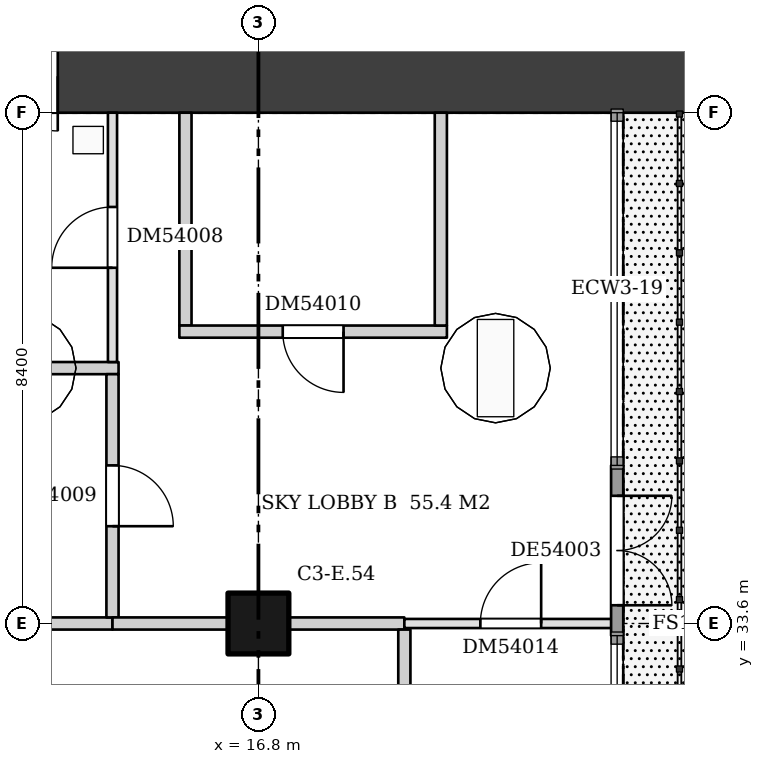
"""IFC4 building model, lengths in metres.
Left out: names, types, materials, properties, quantities, classifications, styles, units other than length and angle.
Written with IfcOpenShell. Run it as: python <this file> out.ifc"""

import sys

from ifc_helpers import new_model, si_unit, direction, frame, frame_2d, origin, origin_2d, place, context, subcontext, project, spatial, rectangle, extrude, element, fill, save


model = new_model("IFC4")
c1 = context("Model", 3, precision=1e-05, world=origin(), true_north=direction((0.0, 1.0)))
c2 = subcontext(c1, "Body", "Model", "MODEL_VIEW")
j1 = project(units=[si_unit("LENGTHUNIT", "METRE"), si_unit("PLANEANGLEUNIT", "RADIAN")], contexts=[c1])
p1 = place(None, origin())
s1 = spatial("IfcSite", under=j1, at=p1, CompositionType="ELEMENT")
p2 = place(p1, origin())
s2 = spatial("IfcBuilding", under=s1, at=p2, CompositionType="ELEMENT")
p3 = place(p2, frame((0.0, 0.0, 207.2)))
s3 = spatial("IfcBuildingStorey", under=s2, at=p3, CompositionType="ELEMENT", Elevation=207.2)
p4 = place(p3, frame((16.8, 33.6, 0.0), z_axis=(0.0, 0.0, 1.0), x_axis=(1.0, 0.0, 0.0)))
e1 = element("IfcColumn", 1, at=p4, inside=s3, PredefinedType="COLUMN", context=c2, shape_type="SweptSolid", body=[
    extrude(rectangle(XDim=1.0, YDim=1.0, at=origin_2d()), origin(), (0.0, 0.0, 1.0), 6.72),
])
p5 = place(p3, frame((9.6, 42.6, 0.0), z_axis=(0.0, 0.0, 1.0), x_axis=(1.0, 0.0, 0.0)))
e2 = element("IfcWall", 2, at=p5, inside=s3, PredefinedType="SHEAR", context=c2, shape_type="SweptSolid", body=[
    extrude(rectangle(XDim=14.4, YDim=1.2, at=frame_2d((7.2, 0.0))), origin(), (0.0, 0.0, 1.0), 6.72),
])
p6 = place(p5, frame((2.1, 0.0, 0.0)))
e3 = element("IfcOpeningElement", 3, at=p6, cuts=e2, PredefinedType="OPENING", context=c2, shape_type="SweptSolid", body=[
    extrude(rectangle(XDim=1.8, YDim=2.1, at=frame_2d((0.9, 1.05))), frame((0.0, 0.61, 0.0), z_axis=(0.0, -1.0, 0.0), x_axis=(1.0, 0.0, 0.0)), (0.0, 0.0, 1.0), 1.22),
])
p7 = place(p3, frame((10.9, 33.6, 0.0), z_axis=(0.0, 0.0, 1.0), x_axis=(1.0, 0.0, 0.0)))
e4 = element("IfcWall", 4, at=p7, inside=s3, PredefinedType="PARTITIONING", context=c2, shape_type="SweptSolid", body=[
    extrude(rectangle(XDim=3.5, YDim=0.2, at=frame_2d((1.75, 0.0))), origin(), (0.0, 0.0, 1.0), 6.72),
])
p8 = place(p3, frame((10.9, 37.8, 0.0), z_axis=(0.0, 0.0, 1.0), x_axis=(1.0, 0.0, 0.0)))
e5 = element("IfcWall", 5, at=p8, inside=s3, PredefinedType="PARTITIONING", context=c2, shape_type="SweptSolid", body=[
    extrude(rectangle(XDim=3.6, YDim=0.2, at=frame_2d((1.8, 0.0))), origin(), (0.0, 0.0, 1.0), 6.72),
])
p9 = place(p3, frame((14.4, 33.7, 0.0), z_axis=(0.0, 0.0, 1.0), x_axis=(0.0, 1.0, 0.0)))
e6 = element("IfcWall", 6, at=p9, inside=s3, PredefinedType="PARTITIONING", context=c2, shape_type="SweptSolid", body=[
    extrude(rectangle(XDim=4.0, YDim=0.2, at=frame_2d((2.0, 0.0))), origin(), (0.0, 0.0, 1.0), 6.72),
])
p10 = place(p9, frame((1.5, 0.0, 0.0)))
e7 = element("IfcOpeningElement", 7, at=p10, cuts=e6, PredefinedType="OPENING", context=c2, shape_type="SweptSolid", body=[
    extrude(rectangle(XDim=1.0, YDim=2.1, at=frame_2d((0.5, 1.05))), frame((0.0, 0.11, 0.0), z_axis=(0.0, -1.0, 0.0), x_axis=(1.0, 0.0, 0.0)), (0.0, 0.0, 1.0), 0.22),
])
p11 = place(p3, frame((14.4, 33.6, 0.0), z_axis=(0.0, 0.0, 1.0), x_axis=(1.0, 0.0, 0.0)))
e8 = element("IfcWall", 8, at=p11, inside=s3, PredefinedType="PARTITIONING", context=c2, shape_type="SweptSolid", body=[
    extrude(rectangle(XDim=1.9, YDim=0.2, at=frame_2d((0.95, 0.0))), origin(), (0.0, 0.0, 1.0), 6.72),
])
p12 = place(p3, frame((17.3, 33.6, 0.0), z_axis=(0.0, 0.0, 1.0), x_axis=(1.0, 0.0, 0.0)))
e9 = element("IfcWall", 9, at=p12, inside=s3, PredefinedType="PARTITIONING", context=c2, shape_type="SweptSolid", body=[
    extrude(rectangle(XDim=1.9, YDim=0.2, at=frame_2d((0.95, 0.0))), origin(), (0.0, 0.0, 1.0), 6.72),
])
p13 = place(p3, frame((14.4, 37.9, 0.0), z_axis=(0.0, 0.0, 1.0), x_axis=(0.0, 1.0, 0.0)))
e10 = element("IfcWall", 10, at=p13, inside=s3, PredefinedType="PARTITIONING", context=c2, shape_type="SweptSolid", body=[
    extrude(rectangle(XDim=4.1, YDim=0.15, at=frame_2d((2.05, 0.0))), origin(), (0.0, 0.0, 1.0), 6.72),
])
p14 = place(p13, frame((1.55, 0.0, 0.0)))
e11 = element("IfcOpeningElement", 11, at=p14, cuts=e10, PredefinedType="OPENING", context=c2, shape_type="SweptSolid", body=[
    extrude(rectangle(XDim=1.0, YDim=2.1, at=frame_2d((0.5, 1.05))), frame((0.0, 0.085, 0.0), z_axis=(0.0, -1.0, 0.0), x_axis=(1.0, 0.0, 0.0)), (0.0, 0.0, 1.0), 0.17),
])
p15 = place(p3, frame((15.6, 38.5, 0.0), z_axis=(0.0, 0.0, 1.0), x_axis=(0.0, 1.0, 0.0)))
e12 = element("IfcWall", 12, at=p15, inside=s3, PredefinedType="PARTITIONING", context=c2, shape_type="SweptSolid", body=[
    extrude(rectangle(XDim=3.5, YDim=0.2, at=frame_2d((1.75, 0.0))), origin(), (0.0, 0.0, 1.0), 6.72),
])
p16 = place(p3, frame((15.5, 38.4, 0.0), z_axis=(0.0, 0.0, 1.0), x_axis=(1.0, 0.0, 0.0)))
e13 = element("IfcWall", 13, at=p16, inside=s3, PredefinedType="PARTITIONING", context=c2, shape_type="SweptSolid", body=[
    extrude(rectangle(XDim=4.4, YDim=0.2, at=frame_2d((2.2, 0.0))), origin(), (0.0, 0.0, 1.0), 6.72),
])
p17 = place(p16, frame((1.7, 0.0, 0.0)))
e14 = element("IfcOpeningElement", 14, at=p17, cuts=e13, PredefinedType="OPENING", context=c2, shape_type="SweptSolid", body=[
    extrude(rectangle(XDim=1.0, YDim=2.1, at=frame_2d((0.5, 1.05))), frame((0.0, 0.11, 0.0), z_axis=(0.0, -1.0, 0.0), x_axis=(1.0, 0.0, 0.0)), (0.0, 0.0, 1.0), 0.22),
])
p18 = place(p3, frame((19.2, 29.5, 0.0), z_axis=(0.0, 0.0, 1.0), x_axis=(0.0, 1.0, 0.0)))
e15 = element("IfcWall", 15, at=p18, inside=s3, PredefinedType="PARTITIONING", context=c2, shape_type="SweptSolid", body=[
    extrude(rectangle(XDim=4.0, YDim=0.2, at=frame_2d((2.0, 0.0))), origin(), (0.0, 0.0, 1.0), 6.72),
])
p19 = place(p18, frame((1.0, 0.0, 0.0)))
e16 = element("IfcOpeningElement", 16, at=p19, cuts=e15, PredefinedType="OPENING", context=c2, shape_type="SweptSolid", body=[
    extrude(rectangle(XDim=2.0, YDim=2.1, at=frame_2d((1.0, 1.05))), frame((0.0, 0.11, 0.0), z_axis=(0.0, -1.0, 0.0), x_axis=(1.0, 0.0, 0.0)), (0.0, 0.0, 1.0), 0.22),
])
p20 = place(p3, frame((19.2, 33.6, 0.0), z_axis=(0.0, 0.0, 1.0), x_axis=(1.0, 0.0, 0.0)))
e17 = element("IfcWall", 17, at=p20, inside=s3, PredefinedType="PARTITIONING", context=c2, shape_type="SweptSolid", body=[
    extrude(rectangle(XDim=3.5, YDim=0.15, at=frame_2d((1.75, 0.0))), origin(), (0.0, 0.0, 1.0), 6.72),
])
p21 = place(p20, frame((1.25, 0.0, 0.0)))
e18 = element("IfcOpeningElement", 18, at=p21, cuts=e17, PredefinedType="OPENING", context=c2, shape_type="SweptSolid", body=[
    extrude(rectangle(XDim=1.0, YDim=2.1, at=frame_2d((0.5, 1.05))), frame((0.0, 0.085, 0.0), z_axis=(0.0, -1.0, 0.0), x_axis=(1.0, 0.0, 0.0)), (0.0, 0.0, 1.0), 0.17),
])
p22 = place(p3, frame((19.8, 38.5, 0.0), z_axis=(0.0, 0.0, 1.0), x_axis=(0.0, 1.0, 0.0)))
e19 = element("IfcWall", 19, at=p22, inside=s3, PredefinedType="PARTITIONING", context=c2, shape_type="SweptSolid", body=[
    extrude(rectangle(XDim=3.5, YDim=0.2, at=frame_2d((1.75, 0.0))), origin(), (0.0, 0.0, 1.0), 6.72),
])
p23 = place(p3, frame((22.7, 33.4, 0.0), z_axis=(0.0, 0.0, 1.0), x_axis=(0.0, 1.0, 0.0)))
e20 = element("IfcWall", 20, at=p23, inside=s3, PredefinedType="SOLIDWALL", context=c2, shape_type="SweptSolid", body=[
    extrude(rectangle(XDim=2.8, YDim=0.2, at=frame_2d((1.4, 0.0))), origin(), (0.0, 0.0, 1.0), 6.72),
])
p24 = place(p23, frame((0.5, 0.0, 0.0)))
e21 = element("IfcOpeningElement", 21, at=p24, cuts=e20, PredefinedType="OPENING", context=c2, shape_type="SweptSolid", body=[
    extrude(rectangle(XDim=1.8, YDim=2.4, at=frame_2d((0.9, 1.2))), frame((0.0, 0.11, 0.0), z_axis=(0.0, -1.0, 0.0), x_axis=(1.0, 0.0, 0.0)), (0.0, 0.0, 1.0), 0.22),
])
p25 = place(p6, frame((1.8, 0.0, 0.0), z_axis=(0.0, 0.0, 1.0), x_axis=(-1.0, 0.0, 0.0)))
e22 = element("IfcDoor", 22, at=p25, inside=s3, OperationType="DOUBLE_DOOR_SINGLE_SWING", PredefinedType="DOOR", context=c2, shape_type="SweptSolid", body=[
    extrude(rectangle(XDim=1.8, YDim=2.1, at=frame_2d((0.9, 1.05))), frame((0.0, 0.025, 0.0), z_axis=(0.0, -1.0, 0.0), x_axis=(1.0, 0.0, 0.0)), (0.0, 0.0, 1.0), 0.05),
])
fill(e3, e22)
p26 = place(p14, origin())
e23 = element("IfcDoor", 23, at=p26, inside=s3, OperationType="SINGLE_SWING_LEFT", PredefinedType="DOOR", context=c2, shape_type="SweptSolid", body=[
    extrude(rectangle(XDim=1.0, YDim=2.1, at=frame_2d((0.5, 1.05))), frame((0.0, 0.025, 0.0), z_axis=(0.0, -1.0, 0.0), x_axis=(1.0, 0.0, 0.0)), (0.0, 0.0, 1.0), 0.05),
])
fill(e11, e23)
p27 = place(p10, frame((1.0, 0.0, 0.0), z_axis=(0.0, 0.0, 1.0), x_axis=(-1.0, 0.0, 0.0)))
e24 = element("IfcDoor", 24, at=p27, inside=s3, OperationType="SINGLE_SWING_RIGHT", PredefinedType="DOOR", context=c2, shape_type="SweptSolid", body=[
    extrude(rectangle(XDim=1.0, YDim=2.1, at=frame_2d((0.5, 1.05))), frame((0.0, 0.025, 0.0), z_axis=(0.0, -1.0, 0.0), x_axis=(1.0, 0.0, 0.0)), (0.0, 0.0, 1.0), 0.05),
])
fill(e7, e24)
p28 = place(p17, frame((1.0, 0.0, 0.0), z_axis=(0.0, 0.0, 1.0), x_axis=(-1.0, 0.0, 0.0)))
e25 = element("IfcDoor", 25, at=p28, inside=s3, OperationType="SINGLE_SWING_LEFT", PredefinedType="DOOR", context=c2, shape_type="SweptSolid", body=[
    extrude(rectangle(XDim=1.0, YDim=2.1, at=frame_2d((0.5, 1.05))), frame((0.0, 0.025, 0.0), z_axis=(0.0, -1.0, 0.0), x_axis=(1.0, 0.0, 0.0)), (0.0, 0.0, 1.0), 0.05),
])
fill(e14, e25)
p29 = place(p21, origin())
e26 = element("IfcDoor", 26, at=p29, inside=s3, OperationType="SINGLE_SWING_RIGHT", PredefinedType="DOOR", context=c2, shape_type="SweptSolid", body=[
    extrude(rectangle(XDim=1.0, YDim=2.1, at=frame_2d((0.5, 1.05))), frame((0.0, 0.025, 0.0), z_axis=(0.0, -1.0, 0.0), x_axis=(1.0, 0.0, 0.0)), (0.0, 0.0, 1.0), 0.05),
])
fill(e18, e26)
p30 = place(p24, frame((1.8, 0.0, 0.0), z_axis=(0.0, 0.0, 1.0), x_axis=(-1.0, 0.0, 0.0)))
e27 = element("IfcDoor", 27, at=p30, inside=s3, OperationType="DOUBLE_DOOR_SINGLE_SWING", PredefinedType="DOOR", context=c2, shape_type="SweptSolid", body=[
    extrude(rectangle(XDim=1.8, YDim=2.4, at=frame_2d((0.9, 1.2))), frame((0.0, 0.025, 0.0), z_axis=(0.0, -1.0, 0.0), x_axis=(1.0, 0.0, 0.0)), (0.0, 0.0, 1.0), 0.05),
])
fill(e21, e27)
save(model, sys.argv[1])
